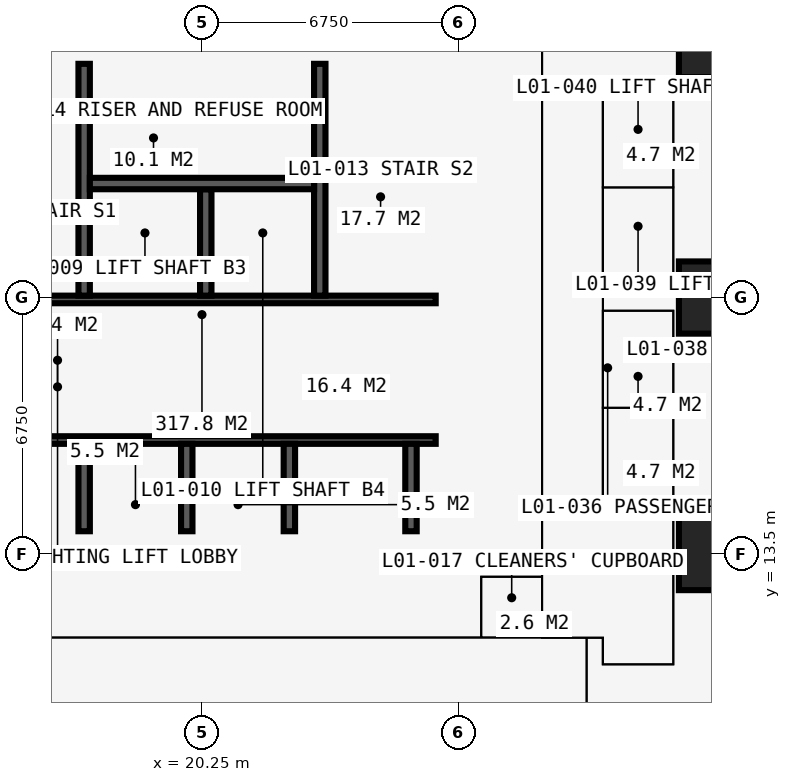
"""IFC4 building model, lengths in metres.
Left out: names, types, materials, properties, quantities, classifications, styles, units other than length and angle.
Written with IfcOpenShell. Run it as: python <this file> out.ifc"""

import sys

from ifc_helpers import new_model, si_unit, direction, frame, frame_2d, origin, origin_2d, place, context, subcontext, project, spatial, rectangle, extrude, element, fill, save


model = new_model("IFC4")
c1 = context("Model", 3, precision=1e-05, world=origin(), true_north=direction((0.0, 1.0)))
c2 = subcontext(c1, "Body", "Model", "MODEL_VIEW")
j1 = project(units=[si_unit("LENGTHUNIT", "METRE"), si_unit("PLANEANGLEUNIT", "RADIAN")], contexts=[c1])
p1 = place(None, origin())
s1 = spatial("IfcSite", under=j1, at=p1, CompositionType="ELEMENT")
p2 = place(p1, origin())
s2 = spatial("IfcBuilding", under=s1, at=p2, CompositionType="ELEMENT")
p3 = place(p2, frame((0.0, 0.0, 4.5)))
s3 = spatial("IfcBuildingStorey", under=s2, at=p3, CompositionType="ELEMENT", Elevation=4.5)
for number, where, z_axis, x_axis in (
    (1, (33.75, 13.5, 0.0), (0.0, 0.0, 1.0), (1.0, 0.0, 0.0)),
    (2, (33.75, 20.25, 0.0), (0.0, 0.0, 1.0), (1.0, 0.0, 0.0)),
    (3, (33.75, 27.0, 0.0), (0.0, 0.0, 1.0), (1.0, 0.0, 0.0)),
):
    element("IfcColumn", number, at=place(p3, frame(where, z_axis=z_axis, x_axis=x_axis)), inside=s3, PredefinedType="COLUMN", context=c2, shape_type="SweptSolid", body=[
        extrude(rectangle(XDim=1.9, YDim=1.9, at=origin_2d()), origin(), (0.0, 0.0, 1.0), 4.5),
    ])
p4 = place(p3, frame((12.9, 13.5, 0.0), z_axis=(0.0, 0.0, 1.0), x_axis=(1.0, 0.0, 0.0)))
e4 = element("IfcWall", 4, at=p4, inside=s3, PredefinedType="SHEAR", context=c2, shape_type="SweptSolid", body=[
    extrude(rectangle(XDim=14.7, YDim=1.2, at=frame_2d((7.35, 0.0))), origin(), (0.0, 0.0, 1.0), 4.5),
])
p5 = place(p3, frame((27.0, 14.1, 0.0), z_axis=(0.0, 0.0, 1.0), x_axis=(0.0, 1.0, 0.0)))
e5 = element("IfcWall", 5, at=p5, inside=s3, PredefinedType="SHEAR", context=c2, shape_type="SweptSolid", body=[
    extrude(rectangle(XDim=12.3, YDim=1.2, at=frame_2d((6.15, 0.0))), origin(), (0.0, 0.0, 1.0), 4.5),
])
p6 = place(p5, frame((3.65, 0.0, 0.0)))
e6 = element("IfcOpeningElement", 6, at=p6, cuts=e5, PredefinedType="OPENING", context=c2, shape_type="SweptSolid", body=[
    extrude(rectangle(XDim=1.2, YDim=2.2, at=frame_2d((0.6, 1.1))), frame((0.0, 0.61, 0.0), z_axis=(0.0, -1.0, 0.0), x_axis=(1.0, 0.0, 0.0)), (0.0, 0.0, 1.0), 1.22),
])
p7 = place(p3, frame((27.6, 27.0, 0.0), z_axis=(0.0, 0.0, 1.0), x_axis=(-1.0, 0.0, 0.0)))
e7 = element("IfcWall", 7, at=p7, inside=s3, PredefinedType="SHEAR", context=c2, shape_type="SweptSolid", body=[
    extrude(rectangle(XDim=14.7, YDim=1.2, at=frame_2d((7.35, 0.0))), origin(), (0.0, 0.0, 1.0), 4.5),
])
p8 = place(p7, frame((4.55, 0.0, 0.0)))
e8 = element("IfcOpeningElement", 8, at=p8, cuts=e7, PredefinedType="OPENING", context=c2, shape_type="SweptSolid", body=[
    extrude(rectangle(XDim=0.9, YDim=2.2, at=frame_2d((0.45, 1.1))), frame((0.0, 0.61, 0.0), z_axis=(0.0, -1.0, 0.0), x_axis=(1.0, 0.0, 0.0)), (0.0, 0.0, 1.0), 1.22),
])
p9 = place(p7, frame((7.525, 0.0, 0.0)))
e9 = element("IfcOpeningElement", 9, at=p9, cuts=e7, PredefinedType="OPENING", context=c2, shape_type="SweptSolid", body=[
    extrude(rectangle(XDim=1.0, YDim=2.2, at=frame_2d((0.5, 1.1))), frame((0.0, 0.61, 0.0), z_axis=(0.0, -1.0, 0.0), x_axis=(1.0, 0.0, 0.0)), (0.0, 0.0, 1.0), 1.22),
])
p10 = place(p3, frame((14.1, 16.5, 0.0), z_axis=(0.0, 0.0, 1.0), x_axis=(1.0, 0.0, 0.0)))
e10 = element("IfcWall", 10, at=p10, inside=s3, PredefinedType="SHEAR", context=c2, shape_type="SweptSolid", body=[
    extrude(rectangle(XDim=12.3, YDim=0.2, at=frame_2d((6.15, 0.0))), origin(), (0.0, 0.0, 1.0), 4.5),
])
p11 = place(p10, frame((0.9, 0.0, 0.0)))
e11 = element("IfcOpeningElement", 11, at=p11, cuts=e10, PredefinedType="OPENING", context=c2, shape_type="SweptSolid", body=[
    extrude(rectangle(XDim=1.1, YDim=2.2, at=frame_2d((0.55, 1.1))), frame((0.0, 0.11, 0.0), z_axis=(0.0, -1.0, 0.0), x_axis=(1.0, 0.0, 0.0)), (0.0, 0.0, 1.0), 0.22),
])
p12 = place(p10, frame((9.5, 0.0, 0.0)))
e12 = element("IfcOpeningElement", 12, at=p12, cuts=e10, PredefinedType="OPENING", context=c2, shape_type="SweptSolid", body=[
    extrude(rectangle(XDim=1.1, YDim=2.2, at=frame_2d((0.55, 1.1))), frame((0.0, 0.11, 0.0), z_axis=(0.0, -1.0, 0.0), x_axis=(1.0, 0.0, 0.0)), (0.0, 0.0, 1.0), 0.22),
])
p13 = place(p3, frame((14.1, 20.2, 0.0), z_axis=(0.0, 0.0, 1.0), x_axis=(1.0, 0.0, 0.0)))
e13 = element("IfcWall", 13, at=p13, inside=s3, PredefinedType="SHEAR", context=c2, shape_type="SweptSolid", body=[
    extrude(rectangle(XDim=12.3, YDim=0.2, at=frame_2d((6.15, 0.0))), origin(), (0.0, 0.0, 1.0), 4.5),
])
p14 = place(p13, frame((0.35, 0.0, 0.0)))
e14 = element("IfcOpeningElement", 14, at=p14, cuts=e13, PredefinedType="OPENING", context=c2, shape_type="SweptSolid", body=[
    extrude(rectangle(XDim=1.1, YDim=2.2, at=frame_2d((0.55, 1.1))), frame((0.0, 0.11, 0.0), z_axis=(0.0, -1.0, 0.0), x_axis=(1.0, 0.0, 0.0)), (0.0, 0.0, 1.0), 0.22),
])
p15 = place(p13, frame((9.75, 0.0, 0.0)))
e15 = element("IfcOpeningElement", 15, at=p15, cuts=e13, PredefinedType="OPENING", context=c2, shape_type="SweptSolid", body=[
    extrude(rectangle(XDim=1.1, YDim=2.2, at=frame_2d((0.55, 1.1))), frame((0.0, 0.11, 0.0), z_axis=(0.0, -1.0, 0.0), x_axis=(1.0, 0.0, 0.0)), (0.0, 0.0, 1.0), 0.22),
])
for number, where, z_axis, x_axis in (
    (16, (17.15, 20.3, 0.0), (0.0, 0.0, 1.0), (0.0, 1.0, 0.0)),
    (17, (23.35, 20.3, 0.0), (0.0, 0.0, 1.0), (0.0, 1.0, 0.0)),
):
    element("IfcWall", number, at=place(p3, frame(where, z_axis=z_axis, x_axis=x_axis)), inside=s3, PredefinedType="SHEAR", context=c2, shape_type="SweptSolid", body=[
        extrude(rectangle(XDim=6.1, YDim=0.3, at=frame_2d((3.05, 0.0))), origin(), (0.0, 0.0, 1.0), 4.5),
    ])
p16 = place(p3, frame((20.35, 20.3, 0.0), z_axis=(0.0, 0.0, 1.0), x_axis=(0.0, 1.0, 0.0)))
e18 = element("IfcWall", 18, at=p16, inside=s3, PredefinedType="SHEAR", context=c2, shape_type="SweptSolid", body=[
    extrude(rectangle(XDim=2.8, YDim=0.3, at=frame_2d((1.4, 0.0))), origin(), (0.0, 0.0, 1.0), 4.5),
])
p17 = place(p3, frame((17.3, 23.25, 0.0), z_axis=(0.0, 0.0, 1.0), x_axis=(1.0, 0.0, 0.0)))
e19 = element("IfcWall", 19, at=p17, inside=s3, PredefinedType="SHEAR", context=c2, shape_type="SweptSolid", body=[
    extrude(rectangle(XDim=5.9, YDim=0.3, at=frame_2d((2.95, 0.0))), origin(), (0.0, 0.0, 1.0), 4.5),
])
for number, where, z_axis, x_axis in (
    (20, (17.15, 14.1, 0.0), (0.0, 0.0, 1.0), (0.0, 1.0, 0.0)),
    (21, (19.85, 14.1, 0.0), (0.0, 0.0, 1.0), (0.0, 1.0, 0.0)),
    (22, (22.55, 14.1, 0.0), (0.0, 0.0, 1.0), (0.0, 1.0, 0.0)),
    (23, (25.75, 14.1, 0.0), (0.0, 0.0, 1.0), (0.0, 1.0, 0.0)),
):
    element("IfcWall", number, at=place(p3, frame(where, z_axis=z_axis, x_axis=x_axis)), inside=s3, PredefinedType="SHEAR", context=c2, shape_type="SweptSolid", body=[
        extrude(rectangle(XDim=2.3, YDim=0.3, at=frame_2d((1.15, 0.0))), origin(), (0.0, 0.0, 1.0), 4.5),
    ])
p18 = place(p3, frame((18.875, 16.6, 0.0), z_axis=(0.0, 0.0, 1.0), x_axis=(0.0, 1.0, 0.0)))
e24 = element("IfcWall", 24, at=p18, inside=s3, PredefinedType="PARTITIONING", context=c2, shape_type="SweptSolid", body=[
    extrude(rectangle(XDim=3.5, YDim=0.15, at=frame_2d((1.75, 0.0))), origin(), (0.0, 0.0, 1.0), 4.25),
])
p19 = place(p18, frame((1.15, 0.0, 0.0)))
e25 = element("IfcOpeningElement", 25, at=p19, cuts=e24, PredefinedType="OPENING", context=c2, shape_type="SweptSolid", body=[
    extrude(rectangle(XDim=1.2, YDim=2.2, at=frame_2d((0.6, 1.1))), frame((0.0, 0.085, 0.0), z_axis=(0.0, -1.0, 0.0), x_axis=(1.0, 0.0, 0.0)), (0.0, 0.0, 1.0), 0.17),
])
p20 = place(p3, frame((21.625, 16.6, 0.0), z_axis=(0.0, 0.0, 1.0), x_axis=(0.0, 1.0, 0.0)))
e26 = element("IfcWall", 26, at=p20, inside=s3, PredefinedType="PARTITIONING", context=c2, shape_type="SweptSolid", body=[
    extrude(rectangle(XDim=3.5, YDim=0.15, at=frame_2d((1.75, 0.0))), origin(), (0.0, 0.0, 1.0), 4.25),
])
p21 = place(p20, frame((1.15, 0.0, 0.0)))
e27 = element("IfcOpeningElement", 27, at=p21, cuts=e26, PredefinedType="OPENING", context=c2, shape_type="SweptSolid", body=[
    extrude(rectangle(XDim=1.2, YDim=2.2, at=frame_2d((0.6, 1.1))), frame((0.0, 0.085, 0.0), z_axis=(0.0, -1.0, 0.0), x_axis=(1.0, 0.0, 0.0)), (0.0, 0.0, 1.0), 0.17),
])
p22 = place(p3, frame((20.12, 16.6, 0.0), z_axis=(0.0, 0.0, 1.0), x_axis=(0.0, 1.0, 0.0)))
e28 = element("IfcWall", 28, at=p22, inside=s3, PredefinedType="PARTITIONING", context=c2, shape_type="SweptSolid", body=[
    extrude(rectangle(XDim=3.5, YDim=0.15, at=frame_2d((1.75, 0.0))), origin(), (0.0, 0.0, 1.0), 4.25),
])
p23 = place(p3, frame((20.725, 23.4, 0.0), z_axis=(0.0, 0.0, 1.0), x_axis=(0.0, 1.0, 0.0)))
e29 = element("IfcWall", 29, at=p23, inside=s3, PredefinedType="PARTITIONING", context=c2, shape_type="SweptSolid", body=[
    extrude(rectangle(XDim=3.0, YDim=0.15, at=frame_2d((1.5, 0.0))), origin(), (0.0, 0.0, 1.0), 4.25),
])
p24 = place(p3, frame((10.125, 11.3, 0.0), z_axis=(0.0, 0.0, 1.0), x_axis=(1.0, 0.0, 0.0)))
e30 = element("IfcWall", 30, at=p24, inside=s3, PredefinedType="PARTITIONING", context=c2, shape_type="SweptSolid", body=[
    extrude(rectangle(XDim=20.675, YDim=0.15, at=frame_2d((10.337, 0.0))), origin(), (0.0, 0.0, 1.0), 4.25),
])
p25 = place(p24, frame((1.725, 0.0, 0.0)))
e31 = element("IfcOpeningElement", 31, at=p25, cuts=e30, PredefinedType="OPENING", context=c2, shape_type="SweptSolid", body=[
    extrude(rectangle(XDim=1.0, YDim=2.2, at=frame_2d((0.5, 1.1))), frame((0.0, 0.085, 0.0), z_axis=(0.0, -1.0, 0.0), x_axis=(1.0, 0.0, 0.0)), (0.0, 0.0, 1.0), 0.17),
])
p26 = place(p24, frame((3.825, 0.0, 0.0)))
e32 = element("IfcOpeningElement", 32, at=p26, cuts=e30, PredefinedType="OPENING", context=c2, shape_type="SweptSolid", body=[
    extrude(rectangle(XDim=1.0, YDim=2.2, at=frame_2d((0.5, 1.1))), frame((0.0, 0.085, 0.0), z_axis=(0.0, -1.0, 0.0), x_axis=(1.0, 0.0, 0.0)), (0.0, 0.0, 1.0), 0.17),
])
p27 = place(p24, frame((10.625, 0.0, 0.0)))
e33 = element("IfcOpeningElement", 33, at=p27, cuts=e30, PredefinedType="OPENING", context=c2, shape_type="SweptSolid", body=[
    extrude(rectangle(XDim=1.6, YDim=2.4, at=frame_2d((0.8, 1.2))), frame((0.0, 0.085, 0.0), z_axis=(0.0, -1.0, 0.0), x_axis=(1.0, 0.0, 0.0)), (0.0, 0.0, 1.0), 0.17),
])
p28 = place(p3, frame((27.6, 11.3, 0.0), z_axis=(0.0, 0.0, 1.0), x_axis=(0.0, 1.0, 0.0)))
e34 = element("IfcWall", 34, at=p28, inside=s3, PredefinedType="PARTITIONING", context=c2, shape_type="SweptSolid", body=[
    extrude(rectangle(XDim=1.6, YDim=0.15, at=frame_2d((0.8, 0.0))), origin(), (0.0, 0.0, 1.0), 4.25),
])
p29 = place(p28, frame((0.3, 0.0, 0.0)))
e35 = element("IfcOpeningElement", 35, at=p29, cuts=e34, PredefinedType="OPENING", context=c2, shape_type="SweptSolid", body=[
    extrude(rectangle(XDim=0.95, YDim=2.2, at=frame_2d((0.475, 1.1))), frame((0.0, 0.085, 0.0), z_axis=(0.0, -1.0, 0.0), x_axis=(1.0, 0.0, 0.0)), (0.0, 0.0, 1.0), 0.17),
])
p30 = place(p3, frame((27.6, 12.9, 0.0), z_axis=(0.0, 0.0, 1.0), x_axis=(1.0, 0.0, 0.0)))
e36 = element("IfcWall", 36, at=p30, inside=s3, PredefinedType="PARTITIONING", context=c2, shape_type="SweptSolid", body=[
    extrude(rectangle(XDim=1.6, YDim=0.15, at=frame_2d((0.8, 0.0))), origin(), (0.0, 0.0, 1.0), 3.752),
])
p31 = place(p3, frame((29.2, 11.3, 0.0), z_axis=(0.0, 0.0, 1.0), x_axis=(0.0, 1.0, 0.0)))
e37 = element("IfcWall", 37, at=p31, inside=s3, PredefinedType="PARTITIONING", context=c2, shape_type="SweptSolid", body=[
    extrude(rectangle(XDim=20.3, YDim=0.15, at=frame_2d((10.15, 0.0))), origin(), (0.0, 0.0, 1.0), 4.25),
])
p32 = place(p31, frame((15.35, 0.0, 0.0)))
e38 = element("IfcOpeningElement", 38, at=p32, cuts=e37, PredefinedType="OPENING", context=c2, shape_type="SweptSolid", body=[
    extrude(rectangle(XDim=1.6, YDim=2.4, at=frame_2d((0.8, 1.2))), frame((0.0, 0.085, 0.0), z_axis=(0.0, -1.0, 0.0), x_axis=(1.0, 0.0, 0.0)), (0.0, 0.0, 1.0), 0.17),
])
p33 = place(p31, frame((8.35, 0.0, 0.0)))
e39 = element("IfcOpeningElement", 39, at=p33, cuts=e37, PredefinedType="OPENING", context=c2, shape_type="SweptSolid", body=[
    extrude(rectangle(XDim=1.2, YDim=2.2, at=frame_2d((0.6, 1.1))), frame((0.0, 0.085, 0.0), z_axis=(0.0, -1.0, 0.0), x_axis=(1.0, 0.0, 0.0)), (0.0, 0.0, 1.0), 0.17),
])
p34 = place(p3, frame((29.2, 25.7, 0.0), z_axis=(0.0, 0.0, 1.0), x_axis=(1.0, 0.0, 0.0)))
e40 = element("IfcWall", 40, at=p34, inside=s3, PredefinedType="SHEAR", context=c2, shape_type="SweptSolid", body=[
    extrude(rectangle(XDim=3.45, YDim=0.1, at=frame_2d((1.725, 0.0))), origin(), (0.0, 0.0, 1.0), 4.25),
])
p35 = place(p3, frame((30.375, -0.75, 0.0), z_axis=(0.0, 0.0, 1.0), x_axis=(0.0, 1.0, 0.0)))
e41 = element("IfcWall", 41, at=p35, inside=s3, PredefinedType="PARTITIONING", context=c2, shape_type="SweptSolid", body=[
    extrude(rectangle(XDim=12.05, YDim=0.15, at=frame_2d((6.025, 0.0))), origin(), (0.0, 0.0, 1.0), 4.25),
])
p36 = place(p3, frame((30.8, 10.6, 0.0), z_axis=(0.0, 0.0, 1.0), x_axis=(0.0, 1.0, 0.0)))
e42 = element("IfcWall", 42, at=p36, inside=s3, PredefinedType="PARTITIONING", context=c2, shape_type="SweptSolid", body=[
    extrude(rectangle(XDim=0.7, YDim=0.15, at=frame_2d((0.35, 0.0))), origin(), (0.0, 0.0, 1.0), 4.25),
])
p37 = place(p3, frame((30.8, 10.6, 0.0), z_axis=(0.0, 0.0, 1.0), x_axis=(1.0, 0.0, 0.0)))
e43 = element("IfcWall", 43, at=p37, inside=s3, PredefinedType="PARTITIONING", context=c2, shape_type="SweptSolid", body=[
    extrude(rectangle(XDim=1.85, YDim=0.15, at=frame_2d((0.925, 0.0))), origin(), (0.0, 0.0, 1.0), 4.25),
])
p38 = place(p3, frame((30.8, 14.8, 0.0), z_axis=(0.0, 0.0, 1.0), x_axis=(0.0, 1.0, 0.0)))
e44 = element("IfcWall", 44, at=p38, inside=s3, PredefinedType="PARTITIONING", context=c2, shape_type="SweptSolid", body=[
    extrude(rectangle(XDim=10.9, YDim=0.15, at=frame_2d((5.45, 0.0))), origin(), (0.0, 0.0, 1.0), 4.25),
])
p39 = place(p38, frame((0.75, 0.0, 0.0)))
e45 = element("IfcOpeningElement", 45, at=p39, cuts=e44, PredefinedType="OPENING", context=c2, shape_type="SweptSolid", body=[
    extrude(rectangle(XDim=1.1, YDim=2.2, at=frame_2d((0.55, 1.1))), frame((0.0, 0.085, 0.0), z_axis=(0.0, -1.0, 0.0), x_axis=(1.0, 0.0, 0.0)), (0.0, 0.0, 1.0), 0.17),
])
p40 = place(p38, frame((3.25, 0.0, 0.0)))
e46 = element("IfcOpeningElement", 46, at=p40, cuts=e44, PredefinedType="OPENING", context=c2, shape_type="SweptSolid", body=[
    extrude(rectangle(XDim=1.1, YDim=2.2, at=frame_2d((0.55, 1.1))), frame((0.0, 0.085, 0.0), z_axis=(0.0, -1.0, 0.0), x_axis=(1.0, 0.0, 0.0)), (0.0, 0.0, 1.0), 0.17),
])
p41 = place(p38, frame((6.5, 0.0, 0.0)))
e47 = element("IfcOpeningElement", 47, at=p41, cuts=e44, PredefinedType="OPENING", context=c2, shape_type="SweptSolid", body=[
    extrude(rectangle(XDim=1.1, YDim=2.2, at=frame_2d((0.55, 1.1))), frame((0.0, 0.085, 0.0), z_axis=(0.0, -1.0, 0.0), x_axis=(1.0, 0.0, 0.0)), (0.0, 0.0, 1.0), 0.17),
])
p42 = place(p38, frame((9.05, 0.0, 0.0)))
e48 = element("IfcOpeningElement", 48, at=p42, cuts=e44, PredefinedType="OPENING", context=c2, shape_type="SweptSolid", body=[
    extrude(rectangle(XDim=1.1, YDim=2.2, at=frame_2d((0.55, 1.1))), frame((0.0, 0.085, 0.0), z_axis=(0.0, -1.0, 0.0), x_axis=(1.0, 0.0, 0.0)), (0.0, 0.0, 1.0), 0.17),
])
for number, where, z_axis, x_axis in (
    (49, (30.8, 14.8, 0.0), (0.0, 0.0, 1.0), (1.0, 0.0, 0.0)),
    (50, (30.8, 17.35, 0.0), (0.0, 0.0, 1.0), (1.0, 0.0, 0.0)),
    (51, (30.8, 19.9, 0.0), (0.0, 0.0, 1.0), (1.0, 0.0, 0.0)),
    (52, (30.8, 20.6, 0.0), (0.0, 0.0, 1.0), (1.0, 0.0, 0.0)),
    (53, (30.8, 23.15, 0.0), (0.0, 0.0, 1.0), (1.0, 0.0, 0.0)),
):
    element("IfcWall", number, at=place(p3, frame(where, z_axis=z_axis, x_axis=x_axis)), inside=s3, PredefinedType="SHEAR", context=c2, shape_type="SweptSolid", body=[
        extrude(rectangle(XDim=1.85, YDim=0.1, at=frame_2d((0.925, 0.0))), origin(), (0.0, 0.0, 1.0), 4.25),
    ])
p43 = place(p3, frame((32.65, 10.6, 0.0), z_axis=(0.0, 0.0, 1.0), x_axis=(0.0, 1.0, 0.0)))
e54 = element("IfcWall", 54, at=p43, inside=s3, PredefinedType="SHEAR", context=c2, shape_type="SweptSolid", body=[
    extrude(rectangle(XDim=9.3, YDim=0.1, at=frame_2d((4.65, 0.0))), origin(), (0.0, 0.0, 1.0), 4.25),
])
p44 = place(p3, frame((32.65, 20.6, 0.0), z_axis=(0.0, 0.0, 1.0), x_axis=(0.0, 1.0, 0.0)))
e55 = element("IfcWall", 55, at=p44, inside=s3, PredefinedType="PARTITIONING", context=c2, shape_type="SweptSolid", body=[
    extrude(rectangle(XDim=5.1, YDim=0.15, at=frame_2d((2.55, 0.0))), origin(), (0.0, 0.0, 1.0), 4.25),
])
p45 = place(p12, origin())
e56 = element("IfcDoor", 56, at=p45, inside=s3, OperationType="DOUBLE_DOOR_SLIDING", PredefinedType="DOOR", context=c2, shape_type="SweptSolid", body=[
    extrude(rectangle(XDim=1.1, YDim=2.2, at=frame_2d((0.55, 1.1))), frame((0.0, 0.025, 0.0), z_axis=(0.0, -1.0, 0.0), x_axis=(1.0, 0.0, 0.0)), (0.0, 0.0, 1.0), 0.05),
])
fill(e12, e56)
p46 = place(p6, origin())
e57 = element("IfcDoor", 57, at=p46, inside=s3, OperationType="DOUBLE_DOOR_SINGLE_SWING", PredefinedType="DOOR", context=c2, shape_type="SweptSolid", body=[
    extrude(rectangle(XDim=1.2, YDim=2.2, at=frame_2d((0.6, 1.1))), frame((0.0, 0.025, 0.0), z_axis=(0.0, -1.0, 0.0), x_axis=(1.0, 0.0, 0.0)), (0.0, 0.0, 1.0), 0.05),
])
fill(e6, e57)
p47 = place(p19, origin())
e58 = element("IfcDoor", 58, at=p47, inside=s3, OperationType="DOUBLE_DOOR_SINGLE_SWING", PredefinedType="DOOR", context=c2, shape_type="SweptSolid", body=[
    extrude(rectangle(XDim=1.2, YDim=2.2, at=frame_2d((0.6, 1.1))), frame((0.0, 0.025, 0.0), z_axis=(0.0, -1.0, 0.0), x_axis=(1.0, 0.0, 0.0)), (0.0, 0.0, 1.0), 0.05),
])
fill(e25, e58)
p48 = place(p21, origin())
e59 = element("IfcDoor", 59, at=p48, inside=s3, OperationType="DOUBLE_DOOR_SINGLE_SWING", PredefinedType="DOOR", context=c2, shape_type="SweptSolid", body=[
    extrude(rectangle(XDim=1.2, YDim=2.2, at=frame_2d((0.6, 1.1))), frame((0.0, 0.025, 0.0), z_axis=(0.0, -1.0, 0.0), x_axis=(1.0, 0.0, 0.0)), (0.0, 0.0, 1.0), 0.05),
])
fill(e27, e59)
p49 = place(p8, origin())
e60 = element("IfcDoor", 60, at=p49, inside=s3, OperationType="SINGLE_SWING_LEFT", PredefinedType="DOOR", context=c2, shape_type="SweptSolid", body=[
    extrude(rectangle(XDim=0.9, YDim=2.2, at=frame_2d((0.45, 1.1))), frame((0.0, 0.4, 0.0), z_axis=(0.0, -1.0, 0.0), x_axis=(1.0, 0.0, 0.0)), (0.0, 0.0, 1.0), 0.8),
])
fill(e8, e60)
p50 = place(p15, origin())
e61 = element("IfcDoor", 61, at=p50, inside=s3, OperationType="SINGLE_SWING_LEFT", PredefinedType="DOOR", context=c2, shape_type="SweptSolid", body=[
    extrude(rectangle(XDim=1.1, YDim=2.2, at=frame_2d((0.55, 1.1))), frame((0.0, 0.025, 0.0), z_axis=(0.0, -1.0, 0.0), x_axis=(1.0, 0.0, 0.0)), (0.0, 0.0, 1.0), 0.05),
])
fill(e15, e61)
p51 = place(p29, origin())
e62 = element("IfcDoor", 62, at=p51, inside=s3, OperationType="SINGLE_SWING_LEFT", PredefinedType="DOOR", context=c2, shape_type="SweptSolid", body=[
    extrude(rectangle(XDim=0.95, YDim=2.2, at=frame_2d((0.475, 1.1))), frame((0.0, 0.025, 0.0), z_axis=(0.0, -1.0, 0.0), x_axis=(1.0, 0.0, 0.0)), (0.0, 0.0, 1.0), 0.05),
])
fill(e35, e62)
p52 = place(p27, origin())
e63 = element("IfcDoor", 63, at=p52, inside=s3, OperationType="DOUBLE_DOOR_SINGLE_SWING", PredefinedType="DOOR", context=c2, shape_type="SweptSolid", body=[
    extrude(rectangle(XDim=1.6, YDim=2.4, at=frame_2d((0.8, 1.2))), frame((0.0, 0.025, 0.0), z_axis=(0.0, -1.0, 0.0), x_axis=(1.0, 0.0, 0.0)), (0.0, 0.0, 1.0), 0.05),
])
fill(e33, e63)
p53 = place(p32, origin())
e64 = element("IfcDoor", 64, at=p53, inside=s3, OperationType="DOUBLE_DOOR_SINGLE_SWING", PredefinedType="DOOR", context=c2, shape_type="SweptSolid", body=[
    extrude(rectangle(XDim=1.6, YDim=2.4, at=frame_2d((0.8, 1.2))), frame((0.0, 0.025, 0.0), z_axis=(0.0, -1.0, 0.0), x_axis=(1.0, 0.0, 0.0)), (0.0, 0.0, 1.0), 0.05),
])
fill(e38, e64)
p54 = place(p39, origin())
e65 = element("IfcDoor", 65, at=p54, inside=s3, OperationType="DOUBLE_DOOR_SLIDING", PredefinedType="DOOR", context=c2, shape_type="SweptSolid", body=[
    extrude(rectangle(XDim=1.1, YDim=2.2, at=frame_2d((0.55, 1.1))), frame((0.0, 0.025, 0.0), z_axis=(0.0, -1.0, 0.0), x_axis=(1.0, 0.0, 0.0)), (0.0, 0.0, 1.0), 0.05),
])
fill(e45, e65)
p55 = place(p40, origin())
e66 = element("IfcDoor", 66, at=p55, inside=s3, OperationType="DOUBLE_DOOR_SLIDING", PredefinedType="DOOR", context=c2, shape_type="SweptSolid", body=[
    extrude(rectangle(XDim=1.1, YDim=2.2, at=frame_2d((0.55, 1.1))), frame((0.0, 0.025, 0.0), z_axis=(0.0, -1.0, 0.0), x_axis=(1.0, 0.0, 0.0)), (0.0, 0.0, 1.0), 0.05),
])
fill(e46, e66)
p56 = place(p41, origin())
e67 = element("IfcDoor", 67, at=p56, inside=s3, OperationType="DOUBLE_DOOR_SLIDING", PredefinedType="DOOR", context=c2, shape_type="SweptSolid", body=[
    extrude(rectangle(XDim=1.1, YDim=2.2, at=frame_2d((0.55, 1.1))), frame((0.0, 0.025, 0.0), z_axis=(0.0, -1.0, 0.0), x_axis=(1.0, 0.0, 0.0)), (0.0, 0.0, 1.0), 0.05),
])
fill(e47, e67)
p57 = place(p42, origin())
e68 = element("IfcDoor", 68, at=p57, inside=s3, OperationType="DOUBLE_DOOR_SLIDING", PredefinedType="DOOR", context=c2, shape_type="SweptSolid", body=[
    extrude(rectangle(XDim=1.1, YDim=2.2, at=frame_2d((0.55, 1.1))), frame((0.0, 0.025, 0.0), z_axis=(0.0, -1.0, 0.0), x_axis=(1.0, 0.0, 0.0)), (0.0, 0.0, 1.0), 0.05),
])
fill(e48, e68)
p58 = place(p33, origin())
e69 = element("IfcDoor", 69, at=p58, inside=s3, OperationType="DOUBLE_DOOR_SINGLE_SWING", PredefinedType="DOOR", context=c2, shape_type="SweptSolid", body=[
    extrude(rectangle(XDim=1.2, YDim=2.2, at=frame_2d((0.6, 1.1))), frame((0.0, 0.025, 0.0), z_axis=(0.0, -1.0, 0.0), x_axis=(1.0, 0.0, 0.0)), (0.0, 0.0, 1.0), 0.05),
])
fill(e39, e69)
save(model, sys.argv[1])
